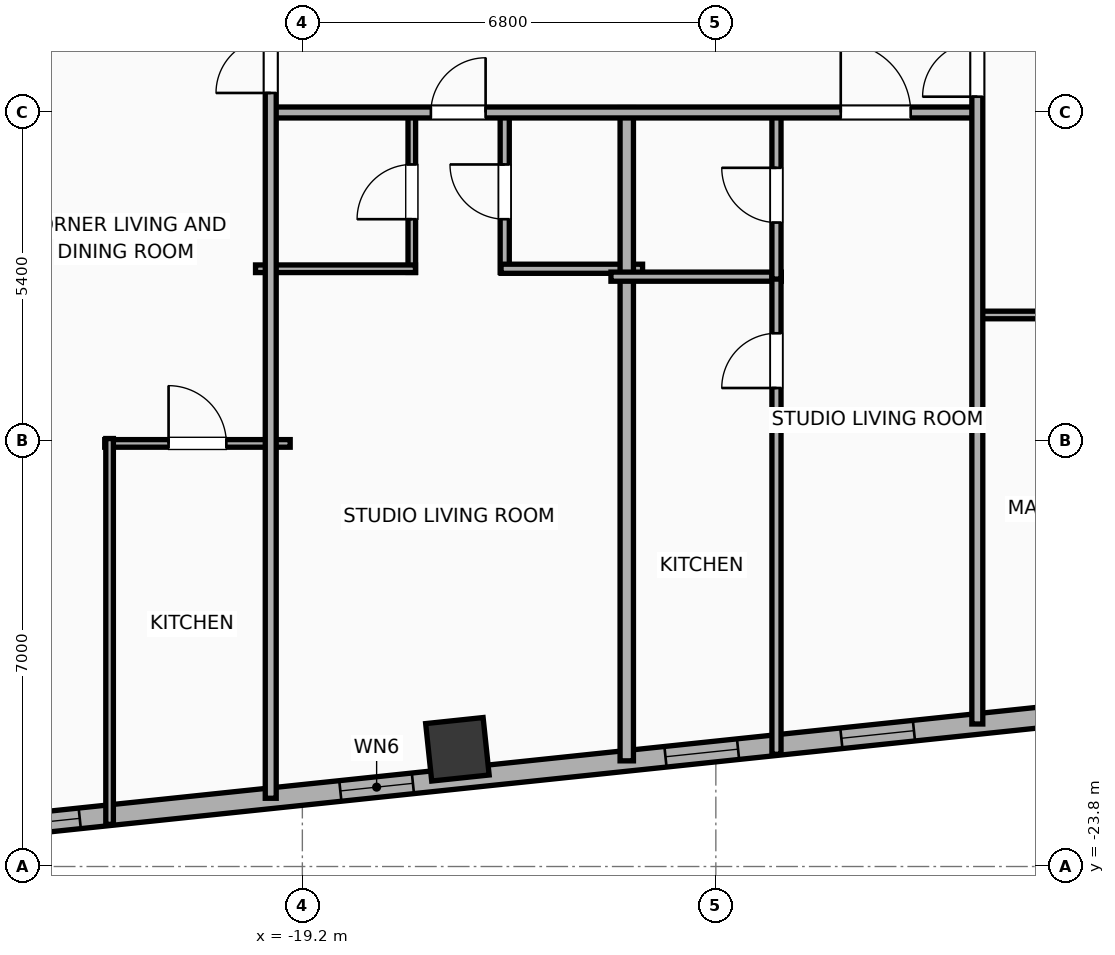
"""IFC4 building model, lengths in metres.
Left out: names, types, materials, properties, quantities, classifications, styles, units other than length and angle.
Written with IfcOpenShell. Run it as: python <this file> out.ifc"""

import sys

from ifc_helpers import new_model, si_unit, direction, frame, frame_2d, origin, origin_2d, place, context, subcontext, project, spatial, rectangle, hollow_rectangle, extrude, element, fill, save


model = new_model("IFC4")
c1 = context("Model", 3, precision=1e-05, world=origin(), true_north=direction((0.0, 1.0)))
c2 = subcontext(c1, "Body", "Model", "MODEL_VIEW")
j1 = project(units=[si_unit("LENGTHUNIT", "METRE"), si_unit("PLANEANGLEUNIT", "RADIAN")], contexts=[c1])
p1 = place(None, origin())
s1 = spatial("IfcSite", under=j1, at=p1, CompositionType="ELEMENT")
p2 = place(p1, origin())
s2 = spatial("IfcBuilding", under=s1, at=p2, CompositionType="ELEMENT")
p3 = place(p2, frame((0.0, 0.0, 152.1)))
s3 = spatial("IfcBuildingStorey", under=s2, at=p3, CompositionType="ELEMENT", Elevation=152.1)
p4 = place(p3, frame((-16.65, -21.873, 0.0), z_axis=(0.0, 0.0, 1.0), x_axis=(0.994521895368, 0.104528463268, 0.0)))
e1 = element("IfcColumn", 1, at=p4, inside=s3, PredefinedType="COLUMN", context=c2, shape_type="SweptSolid", body=[
    extrude(hollow_rectangle(XDim=0.95, YDim=0.95, WallThickness=0.032, at=origin_2d()), origin(), (0.0, 0.0, 1.0), 3.9),
])
p5 = place(p3, frame((24.756, -18.003, 0.0), z_axis=(0.0, 0.0, 1.0), x_axis=(-0.99452160744, -0.104531202687, 0.0)))
e2 = element("IfcWall", 2, at=p5, inside=s3, PredefinedType="ELEMENTEDWALL", context=c2, shape_type="SweptSolid", body=[
    extrude(rectangle(XDim=51.967, YDim=0.34, at=frame_2d((25.983, 0.0))), origin(), (0.0, 0.0, 1.0), 3.65),
])
p6 = place(p5, frame((25.633, 0.0, 0.75)))
e3 = element("IfcOpeningElement", 3, at=p6, cuts=e2, PredefinedType="OPENING", context=c2, shape_type="SweptSolid", body=[
    extrude(rectangle(XDim=2.4, YDim=2.1, at=frame_2d((1.2, 1.05))), frame((0.0, 0.18, 0.0), z_axis=(0.0, -1.0, 0.0), x_axis=(1.0, 0.0, 0.0)), (0.0, 0.0, 1.0), 0.36),
])
p7 = place(p5, frame((42.369, 0.0, 0.75)))
e4 = element("IfcOpeningElement", 4, at=p7, cuts=e2, PredefinedType="OPENING", context=c2, shape_type="SweptSolid", body=[
    extrude(rectangle(XDim=1.2, YDim=2.05, at=frame_2d((0.6, 1.025))), frame((0.0, 0.18, 0.0), z_axis=(0.0, -1.0, 0.0), x_axis=(1.0, 0.0, 0.0)), (0.0, 0.0, 1.0), 0.36),
])
p8 = place(p5, frame((34.085, 0.0, 0.75)))
e5 = element("IfcOpeningElement", 5, at=p8, cuts=e2, PredefinedType="OPENING", context=c2, shape_type="SweptSolid", body=[
    extrude(rectangle(XDim=1.2, YDim=2.05, at=frame_2d((0.6, 1.025))), frame((0.0, 0.18, 0.0), z_axis=(0.0, -1.0, 0.0), x_axis=(1.0, 0.0, 0.0)), (0.0, 0.0, 1.0), 0.36),
])
p9 = place(p5, frame((36.993, 0.0, 0.75)))
e6 = element("IfcOpeningElement", 6, at=p9, cuts=e2, PredefinedType="OPENING", context=c2, shape_type="SweptSolid", body=[
    extrude(rectangle(XDim=1.2, YDim=2.05, at=frame_2d((0.6, 1.025))), frame((0.0, 0.18, 0.0), z_axis=(0.0, -1.0, 0.0), x_axis=(1.0, 0.0, 0.0)), (0.0, 0.0, 1.0), 0.36),
])
p10 = place(p5, frame((14.397, 0.0, 0.75)))
e7 = element("IfcOpeningElement", 7, at=p10, cuts=e2, PredefinedType="OPENING", context=c2, shape_type="SweptSolid", body=[
    extrude(rectangle(XDim=1.2, YDim=2.05, at=frame_2d((0.6, 1.025))), frame((0.0, 0.18, 0.0), z_axis=(0.0, -1.0, 0.0), x_axis=(1.0, 0.0, 0.0)), (0.0, 0.0, 1.0), 0.36),
])
p11 = place(p5, frame((11.489, 0.0, 0.75)))
e8 = element("IfcOpeningElement", 8, at=p11, cuts=e2, PredefinedType="OPENING", context=c2, shape_type="SweptSolid", body=[
    extrude(rectangle(XDim=1.2, YDim=2.05, at=frame_2d((0.6, 1.025))), frame((0.0, 0.18, 0.0), z_axis=(0.0, -1.0, 0.0), x_axis=(1.0, 0.0, 0.0)), (0.0, 0.0, 1.0), 0.36),
])
p12 = place(p5, frame((8.521, 0.0, 0.75)))
e9 = element("IfcOpeningElement", 9, at=p12, cuts=e2, PredefinedType="OPENING", context=c2, shape_type="SweptSolid", body=[
    extrude(rectangle(XDim=1.2, YDim=2.05, at=frame_2d((0.6, 1.025))), frame((0.0, 0.18, 0.0), z_axis=(0.0, -1.0, 0.0), x_axis=(1.0, 0.0, 0.0)), (0.0, 0.0, 1.0), 0.36),
])
p13 = place(p5, frame((5.582, 0.0, 0.75)))
e10 = element("IfcOpeningElement", 10, at=p13, cuts=e2, PredefinedType="OPENING", context=c2, shape_type="SweptSolid", body=[
    extrude(rectangle(XDim=1.2, YDim=2.05, at=frame_2d((0.6, 1.025))), frame((0.0, 0.18, 0.0), z_axis=(0.0, -1.0, 0.0), x_axis=(1.0, 0.0, 0.0)), (0.0, 0.0, 1.0), 0.36),
])
p14 = place(p5, frame((29.313, 0.0, 0.75)))
e11 = element("IfcOpeningElement", 11, at=p14, cuts=e2, PredefinedType="OPENING", context=c2, shape_type="SweptSolid", body=[
    extrude(rectangle(XDim=1.2, YDim=2.05, at=frame_2d((0.6, 1.025))), frame((0.0, 0.18, 0.0), z_axis=(0.0, -1.0, 0.0), x_axis=(1.0, 0.0, 0.0)), (0.0, 0.0, 1.0), 0.36),
])
p15 = place(p5, frame((22.248, 0.0, 0.75)))
e12 = element("IfcOpeningElement", 12, at=p15, cuts=e2, PredefinedType="OPENING", context=c2, shape_type="SweptSolid", body=[
    extrude(rectangle(XDim=1.2, YDim=2.05, at=frame_2d((0.6, 1.025))), frame((0.0, 0.18, 0.0), z_axis=(0.0, -1.0, 0.0), x_axis=(1.0, 0.0, 0.0)), (0.0, 0.0, 1.0), 0.36),
])
p16 = place(p5, frame((18.186, 0.0, 0.75)))
e13 = element("IfcOpeningElement", 13, at=p16, cuts=e2, PredefinedType="OPENING", context=c2, shape_type="SweptSolid", body=[
    extrude(rectangle(XDim=1.2, YDim=2.05, at=frame_2d((0.6, 1.025))), frame((0.0, 0.18, 0.0), z_axis=(0.0, -1.0, 0.0), x_axis=(1.0, 0.0, 0.0)), (0.0, 0.0, 1.0), 0.36),
])
p17 = place(p5, frame((47.879, 0.0, 0.75)))
e14 = element("IfcOpeningElement", 14, at=p17, cuts=e2, PredefinedType="OPENING", context=c2, shape_type="SweptSolid", body=[
    extrude(rectangle(XDim=1.2, YDim=2.05, at=frame_2d((0.6, 1.025))), frame((0.0, 0.18, 0.0), z_axis=(0.0, -1.0, 0.0), x_axis=(1.0, 0.0, 0.0)), (0.0, 0.0, 1.0), 0.36),
])
p18 = place(p5, frame((49.844, 0.0, 0.75)))
e15 = element("IfcOpeningElement", 15, at=p18, cuts=e2, PredefinedType="OPENING", context=c2, shape_type="SweptSolid", body=[
    extrude(rectangle(XDim=1.2, YDim=2.05, at=frame_2d((0.6, 1.025))), frame((0.0, 0.18, 0.0), z_axis=(0.0, -1.0, 0.0), x_axis=(1.0, 0.0, 0.0)), (0.0, 0.0, 1.0), 0.36),
])
p19 = place(p5, frame((0.925, 0.0, 0.75)))
e16 = element("IfcOpeningElement", 16, at=p19, cuts=e2, PredefinedType="OPENING", context=c2, shape_type="SweptSolid", body=[
    extrude(rectangle(XDim=1.2, YDim=2.05, at=frame_2d((0.6, 1.025))), frame((0.0, 0.18, 0.0), z_axis=(0.0, -1.0, 0.0), x_axis=(1.0, 0.0, 0.0)), (0.0, 0.0, 1.0), 0.36),
])
p20 = place(p3, frame((-17.4, -14.03, 0.0), z_axis=(0.0, 0.0, 1.0), x_axis=(0.0, 1.0, 0.0)))
e17 = element("IfcWall", 17, at=p20, inside=s3, PredefinedType="PARTITIONING", context=c2, shape_type="SweptSolid", body=[
    extrude(rectangle(XDim=2.65, YDim=0.125, at=frame_2d((1.325, 0.0))), origin(), (0.0, 0.0, 1.0), 3.65),
])
p21 = place(p20, frame((0.875, 0.0, 0.0)))
e18 = element("IfcOpeningElement", 18, at=p21, cuts=e17, PredefinedType="OPENING", context=c2, shape_type="SweptSolid", body=[
    extrude(rectangle(XDim=0.9, YDim=2.05, at=frame_2d((0.45, 1.025))), frame((0.0, 0.073, 0.0), z_axis=(0.0, -1.0, 0.0), x_axis=(1.0, 0.0, 0.0)), (0.0, 0.0, 1.0), 0.145),
])
p22 = place(p3, frame((-15.872, -14.03, 0.0), z_axis=(0.0, 0.0, 1.0), x_axis=(0.0, 1.0, 0.0)))
e19 = element("IfcWall", 19, at=p22, inside=s3, PredefinedType="PLUMBINGWALL", context=c2, shape_type="SweptSolid", body=[
    extrude(rectangle(XDim=2.65, YDim=0.15, at=frame_2d((1.325, 0.0))), origin(), (0.0, 0.0, 1.0), 3.04),
])
p23 = place(p22, frame((0.875, 0.0, 0.0)))
e20 = element("IfcOpeningElement", 20, at=p23, cuts=e19, PredefinedType="OPENING", context=c2, shape_type="SweptSolid", body=[
    extrude(rectangle(XDim=0.9, YDim=2.05, at=frame_2d((0.45, 1.025))), frame((0.0, 0.085, 0.0), z_axis=(0.0, -1.0, 0.0), x_axis=(1.0, 0.0, 0.0)), (0.0, 0.0, 1.0), 0.17),
])
p24 = place(p3, frame((-19.97, -13.97, 0.0), z_axis=(0.0, 0.0, 1.0), x_axis=(1.0, 0.0, 0.0)))
e21 = element("IfcWall", 21, at=p24, inside=s3, PredefinedType="PARTITIONING", context=c2, shape_type="SweptSolid", body=[
    extrude(rectangle(XDim=2.63, YDim=0.125, at=frame_2d((1.315, 0.0))), origin(), (0.0, 0.0, 1.0), 3.65),
])
p25 = place(p3, frame((-15.932, -13.97, 0.0), z_axis=(0.0, 0.0, 1.0), x_axis=(1.0, 0.0, 0.0)))
e22 = element("IfcWall", 22, at=p25, inside=s3, PredefinedType="PLUMBINGWALL", context=c2, shape_type="SweptSolid", body=[
    extrude(rectangle(XDim=2.327, YDim=0.15, at=frame_2d((1.164, 0.0))), origin(), (0.0, 0.0, 1.0), 3.65),
])
p26 = place(p3, frame((-13.865, -22.062, 0.0), z_axis=(0.0, 0.0, 1.0), x_axis=(0.0, 1.0, 0.0)))
e23 = element("IfcWall", 23, at=p26, inside=s3, PredefinedType="PARTITIONING", context=c2, shape_type="SweptSolid", body=[
    extrude(rectangle(XDim=10.742, YDim=0.22, at=frame_2d((5.371, 0.0))), origin(), (0.0, 0.0, 1.0), 3.65),
])
p27 = place(p3, frame((-14.125, -14.1, 0.0), z_axis=(0.0, 0.0, 1.0), x_axis=(1.0, 0.0, 0.0)))
e24 = element("IfcWall", 24, at=p27, inside=s3, PredefinedType="PLUMBINGWALL", context=c2, shape_type="SweptSolid", body=[
    extrude(rectangle(XDim=2.802, YDim=0.15, at=frame_2d((1.401, 0.0))), origin(), (0.0, 0.0, 1.0), 3.65),
])
p28 = place(p3, frame((-11.403, -21.954, 0.0), z_axis=(0.0, 0.0, 1.0), x_axis=(0.0, 1.0, 0.0)))
e25 = element("IfcWall", 25, at=p28, inside=s3, PredefinedType="PLUMBINGWALL", context=c2, shape_type="SweptSolid", body=[
    extrude(rectangle(XDim=7.894, YDim=0.15, at=frame_2d((3.947, 0.0))), origin(), (0.0, 0.0, 1.0), 3.65),
])
p29 = place(p28, frame((6.023, 0.0, 0.0)))
e26 = element("IfcOpeningElement", 26, at=p29, cuts=e25, PredefinedType="OPENING", context=c2, shape_type="SweptSolid", body=[
    extrude(rectangle(XDim=0.9, YDim=2.05, at=frame_2d((0.45, 1.025))), frame((0.0, 0.085, 0.0), z_axis=(0.0, -1.0, 0.0), x_axis=(1.0, 0.0, 0.0)), (0.0, 0.0, 1.0), 0.17),
])
p30 = place(p3, frame((-11.403, -14.14, 0.0), z_axis=(0.0, 0.0, 1.0), x_axis=(0.0, 1.0, 0.0)))
e27 = element("IfcWall", 27, at=p30, inside=s3, PredefinedType="PLUMBINGWALL", context=c2, shape_type="SweptSolid", body=[
    extrude(rectangle(XDim=2.76, YDim=0.15, at=frame_2d((1.38, 0.0))), origin(), (0.0, 0.0, 1.0), 3.65),
])
p31 = place(p30, frame((0.93, 0.0, 0.0)))
e28 = element("IfcOpeningElement", 28, at=p31, cuts=e27, PredefinedType="OPENING", context=c2, shape_type="SweptSolid", body=[
    extrude(rectangle(XDim=0.9, YDim=2.05, at=frame_2d((0.45, 1.025))), frame((0.0, 0.085, 0.0), z_axis=(0.0, -1.0, 0.0), x_axis=(1.0, 0.0, 0.0)), (0.0, 0.0, 1.0), 0.17),
])
p32 = place(p3, frame((-19.75, -11.4, 0.0), z_axis=(0.0, 0.0, 1.0), x_axis=(1.0, 0.0, 0.0)))
e29 = element("IfcWall", 29, at=p32, inside=s3, PredefinedType="PARTITIONING", context=c2, shape_type="SweptSolid", body=[
    extrude(rectangle(XDim=11.67, YDim=0.18, at=frame_2d((5.835, 0.0))), origin(), (0.0, 0.0, 1.0), 3.65),
])
p33 = place(p32, frame((2.664, 0.0, 0.0)))
e30 = element("IfcOpeningElement", 30, at=p33, cuts=e29, PredefinedType="OPENING", context=c2, shape_type="SweptSolid", body=[
    extrude(rectangle(XDim=0.9, YDim=2.05, at=frame_2d((0.45, 1.025))), frame((0.0, 0.1, 0.0), z_axis=(0.0, -1.0, 0.0), x_axis=(1.0, 0.0, 0.0)), (0.0, 0.0, 1.0), 0.2),
])
p34 = place(p32, frame((9.404, 0.0, 0.0)))
e31 = element("IfcOpeningElement", 31, at=p34, cuts=e29, PredefinedType="OPENING", context=c2, shape_type="SweptSolid", body=[
    extrude(rectangle(XDim=1.15, YDim=2.05, at=frame_2d((0.575, 1.025))), frame((0.0, 0.1, 0.0), z_axis=(0.0, -1.0, 0.0), x_axis=(1.0, 0.0, 0.0)), (0.0, 0.0, 1.0), 0.2),
])
p35 = place(p3, frame((-8.08, -14.73, 0.0), z_axis=(0.0, 0.0, 1.0), x_axis=(1.0, 0.0, 0.0)))
e32 = element("IfcWall", 32, at=p35, inside=s3, PredefinedType="PARTITIONING", context=c2, shape_type="SweptSolid", body=[
    extrude(rectangle(XDim=8.06, YDim=0.125, at=frame_2d((4.03, 0.0))), origin(), (0.0, 0.0, 1.0), 3.65),
])
p36 = place(p35, frame((1.323, 0.0, 0.0)))
e33 = element("IfcOpeningElement", 33, at=p36, cuts=e32, PredefinedType="OPENING", context=c2, shape_type="SweptSolid", body=[
    extrude(rectangle(XDim=0.9, YDim=2.05, at=frame_2d((0.45, 1.025))), frame((0.0, 0.073, 0.0), z_axis=(0.0, -1.0, 0.0), x_axis=(1.0, 0.0, 0.0)), (0.0, 0.0, 1.0), 0.145),
])
p37 = place(p35, frame((4.547, 0.0, 0.0)))
e34 = element("IfcOpeningElement", 34, at=p37, cuts=e32, PredefinedType="OPENING", context=c2, shape_type="SweptSolid", body=[
    extrude(rectangle(XDim=0.9, YDim=2.05, at=frame_2d((0.45, 1.025))), frame((0.0, 0.073, 0.0), z_axis=(0.0, -1.0, 0.0), x_axis=(1.0, 0.0, 0.0)), (0.0, 0.0, 1.0), 0.145),
])
p38 = place(p3, frame((-8.1, -21.456, 0.0), z_axis=(0.0, 0.0, 1.0), x_axis=(0.0, 1.0, 0.0)))
e35 = element("IfcWall", 35, at=p38, inside=s3, PredefinedType="PARTITIONING", context=c2, shape_type="SweptSolid", body=[
    extrude(rectangle(XDim=11.566, YDim=0.18, at=frame_2d((5.783, 0.0))), origin(), (0.0, 0.0, 1.0), 3.65),
])
p39 = place(p38, frame((10.316, 0.0, 0.0)))
e36 = element("IfcOpeningElement", 36, at=p39, cuts=e35, PredefinedType="OPENING", context=c2, shape_type="SweptSolid", body=[
    extrude(rectangle(XDim=0.9, YDim=2.05, at=frame_2d((0.45, 1.025))), frame((0.0, 0.1, 0.0), z_axis=(0.0, -1.0, 0.0), x_axis=(1.0, 0.0, 0.0)), (0.0, 0.0, 1.0), 0.2),
])
p40 = place(p3, frame((-22.45, -16.842, 0.0), z_axis=(0.0, 0.0, 1.0), x_axis=(1.0, 0.0, 0.0)))
e37 = element("IfcWall", 37, at=p40, inside=s3, PredefinedType="PARTITIONING", context=c2, shape_type="SweptSolid", body=[
    extrude(rectangle(XDim=3.05, YDim=0.125, at=frame_2d((1.525, 0.0))), origin(), (0.0, 0.0, 1.0), 3.65),
])
p41 = place(p40, frame((1.05, 0.0, 0.0)))
e38 = element("IfcOpeningElement", 38, at=p41, cuts=e37, PredefinedType="OPENING", context=c2, shape_type="SweptSolid", body=[
    extrude(rectangle(XDim=0.95, YDim=2.05, at=frame_2d((0.475, 1.025))), frame((0.0, 0.073, 0.0), z_axis=(0.0, -1.0, 0.0), x_axis=(1.0, 0.0, 0.0)), (0.0, 0.0, 1.0), 0.145),
])
p42 = place(p3, frame((-22.37, -23.107, 0.0), z_axis=(0.0, 0.0, 1.0), x_axis=(0.0, 1.0, 0.0)))
e39 = element("IfcWall", 39, at=p42, inside=s3, PredefinedType="PARTITIONING", context=c2, shape_type="SweptSolid", body=[
    extrude(rectangle(XDim=6.345, YDim=0.125, at=frame_2d((3.173, 0.0))), origin(), (0.0, 0.0, 1.0), 3.65),
])
p43 = place(p3, frame((-19.72, -22.678, 0.0), z_axis=(0.0, 0.0, 1.0), x_axis=(0.0, 1.0, 0.0)))
e40 = element("IfcWall", 40, at=p43, inside=s3, PredefinedType="PARTITIONING", context=c2, shape_type="SweptSolid", body=[
    extrude(rectangle(XDim=22.678, YDim=0.18, at=frame_2d((11.339, 0.0))), origin(), (0.0, 0.0, 1.0), 3.65),
])
p44 = place(p43, frame((11.599, 0.0, 0.0)))
e41 = element("IfcOpeningElement", 41, at=p44, cuts=e40, PredefinedType="OPENING", context=c2, shape_type="SweptSolid", body=[
    extrude(rectangle(XDim=0.9, YDim=2.05, at=frame_2d((0.45, 1.025))), frame((0.0, 0.1, 0.0), z_axis=(0.0, -1.0, 0.0), x_axis=(1.0, 0.0, 0.0)), (0.0, 0.0, 1.0), 0.2),
])
p45 = place(p7, origin())
e42 = element("IfcWindow", 42, at=p45, inside=s3, PartitioningType="SINGLE_PANEL", PredefinedType="WINDOW", context=c2, shape_type="SweptSolid", body=[
    extrude(rectangle(XDim=1.2, YDim=2.05, at=frame_2d((0.6, 1.025))), frame((0.0, 0.03, 0.0), z_axis=(0.0, -1.0, 0.0), x_axis=(1.0, 0.0, 0.0)), (0.0, 0.0, 1.0), 0.06),
])
fill(e4, e42)
p46 = place(p8, origin())
e43 = element("IfcWindow", 43, at=p46, inside=s3, PartitioningType="SINGLE_PANEL", PredefinedType="WINDOW", context=c2, shape_type="SweptSolid", body=[
    extrude(rectangle(XDim=1.2, YDim=2.05, at=frame_2d((0.6, 1.025))), frame((0.0, 0.03, 0.0), z_axis=(0.0, -1.0, 0.0), x_axis=(1.0, 0.0, 0.0)), (0.0, 0.0, 1.0), 0.06),
])
fill(e5, e43)
p47 = place(p9, origin())
e44 = element("IfcWindow", 44, at=p47, inside=s3, PartitioningType="SINGLE_PANEL", PredefinedType="WINDOW", context=c2, shape_type="SweptSolid", body=[
    extrude(rectangle(XDim=1.2, YDim=2.05, at=frame_2d((0.6, 1.025))), frame((0.0, 0.03, 0.0), z_axis=(0.0, -1.0, 0.0), x_axis=(1.0, 0.0, 0.0)), (0.0, 0.0, 1.0), 0.06),
])
fill(e6, e44)
p48 = place(p17, origin())
e45 = element("IfcWindow", 45, at=p48, inside=s3, PartitioningType="SINGLE_PANEL", PredefinedType="WINDOW", context=c2, shape_type="SweptSolid", body=[
    extrude(rectangle(XDim=1.2, YDim=2.05, at=frame_2d((0.6, 1.025))), frame((0.0, 0.03, 0.0), z_axis=(0.0, -1.0, 0.0), x_axis=(1.0, 0.0, 0.0)), (0.0, 0.0, 1.0), 0.06),
])
fill(e14, e45)
p49 = place(p21, origin())
e46 = element("IfcDoor", 46, at=p49, inside=s3, OperationType="SINGLE_SWING_LEFT", PredefinedType="DOOR", context=c2, shape_type="SweptSolid", body=[
    extrude(rectangle(XDim=0.9, YDim=2.05, at=frame_2d((0.45, 1.025))), frame((0.0, 0.025, 0.0), z_axis=(0.0, -1.0, 0.0), x_axis=(1.0, 0.0, 0.0)), (0.0, 0.0, 1.0), 0.05),
])
fill(e18, e46)
p50 = place(p23, origin())
e47 = element("IfcDoor", 47, at=p50, inside=s3, OperationType="SINGLE_SWING_RIGHT", PredefinedType="DOOR", context=c2, shape_type="SweptSolid", body=[
    extrude(rectangle(XDim=0.9, YDim=2.05, at=frame_2d((0.45, 1.025))), frame((0.0, 0.025, 0.0), z_axis=(0.0, -1.0, 0.0), x_axis=(1.0, 0.0, 0.0)), (0.0, 0.0, 1.0), 0.05),
])
fill(e20, e47)
p51 = place(p29, origin())
e48 = element("IfcDoor", 48, at=p51, inside=s3, OperationType="SINGLE_SWING_LEFT", PredefinedType="DOOR", context=c2, shape_type="SweptSolid", body=[
    extrude(rectangle(XDim=0.9, YDim=2.05, at=frame_2d((0.45, 1.025))), frame((0.0, 0.025, 0.0), z_axis=(0.0, -1.0, 0.0), x_axis=(1.0, 0.0, 0.0)), (0.0, 0.0, 1.0), 0.05),
])
fill(e26, e48)
p52 = place(p31, origin())
e49 = element("IfcDoor", 49, at=p52, inside=s3, OperationType="SINGLE_SWING_RIGHT", PredefinedType="DOOR", context=c2, shape_type="SweptSolid", body=[
    extrude(rectangle(XDim=0.9, YDim=2.05, at=frame_2d((0.45, 1.025))), frame((0.0, 0.025, 0.0), z_axis=(0.0, -1.0, 0.0), x_axis=(1.0, 0.0, 0.0)), (0.0, 0.0, 1.0), 0.05),
])
fill(e28, e49)
p53 = place(p33, origin())
e50 = element("IfcDoor", 50, at=p53, inside=s3, OperationType="SINGLE_SWING_RIGHT", PredefinedType="DOOR", context=c2, shape_type="SweptSolid", body=[
    extrude(rectangle(XDim=0.9, YDim=2.05, at=frame_2d((0.45, 1.025))), frame((0.0, 0.025, 0.0), z_axis=(0.0, -1.0, 0.0), x_axis=(1.0, 0.0, 0.0)), (0.0, 0.0, 1.0), 0.05),
])
fill(e30, e50)
p54 = place(p34, origin())
e51 = element("IfcDoor", 51, at=p54, inside=s3, OperationType="SINGLE_SWING_LEFT", PredefinedType="DOOR", context=c2, shape_type="SweptSolid", body=[
    extrude(rectangle(XDim=1.15, YDim=2.05, at=frame_2d((0.575, 1.025))), frame((0.0, 0.025, 0.0), z_axis=(0.0, -1.0, 0.0), x_axis=(1.0, 0.0, 0.0)), (0.0, 0.0, 1.0), 0.05),
])
fill(e31, e51)
p55 = place(p39, origin())
e52 = element("IfcDoor", 52, at=p55, inside=s3, OperationType="SINGLE_SWING_LEFT", PredefinedType="DOOR", context=c2, shape_type="SweptSolid", body=[
    extrude(rectangle(XDim=0.9, YDim=2.05, at=frame_2d((0.45, 1.025))), frame((0.0, 0.025, 0.0), z_axis=(0.0, -1.0, 0.0), x_axis=(1.0, 0.0, 0.0)), (0.0, 0.0, 1.0), 0.05),
])
fill(e36, e52)
p56 = place(p41, origin())
e53 = element("IfcDoor", 53, at=p56, inside=s3, OperationType="SINGLE_SWING_LEFT", PredefinedType="DOOR", context=c2, shape_type="SweptSolid", body=[
    extrude(rectangle(XDim=0.95, YDim=2.05, at=frame_2d((0.475, 1.025))), frame((0.0, 0.025, 0.0), z_axis=(0.0, -1.0, 0.0), x_axis=(1.0, 0.0, 0.0)), (0.0, 0.0, 1.0), 0.05),
])
fill(e38, e53)
p57 = place(p44, origin())
e54 = element("IfcDoor", 54, at=p57, inside=s3, OperationType="SINGLE_SWING_LEFT", PredefinedType="DOOR", context=c2, shape_type="SweptSolid", body=[
    extrude(rectangle(XDim=0.9, YDim=2.05, at=frame_2d((0.45, 1.025))), frame((0.0, 0.025, 0.0), z_axis=(0.0, -1.0, 0.0), x_axis=(1.0, 0.0, 0.0)), (0.0, 0.0, 1.0), 0.05),
])
fill(e41, e54)
save(model, sys.argv[1])
